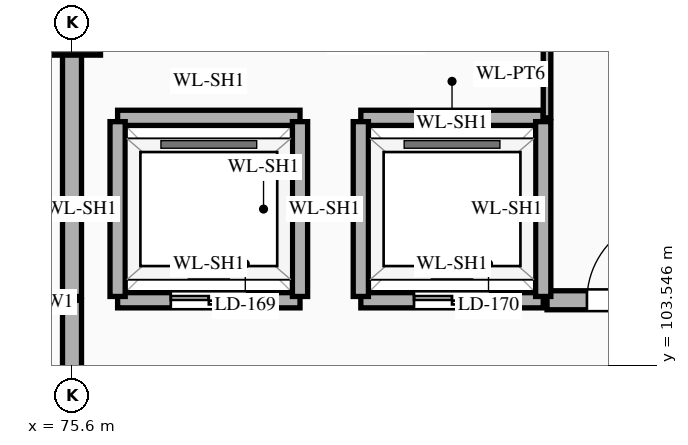
"""IFC4 building model, lengths in metres.
Left out: names, types, materials, properties, quantities, classifications, styles, units other than length and angle.
Written with IfcOpenShell. Run it as: python <this file> out.ifc"""

import sys

from ifc_helpers import new_model, si_unit, direction, frame, frame_2d, origin, origin_2d, place, context, subcontext, project, spatial, rectangle, extrude, element, fill, save


model = new_model("IFC4")
c1 = context("Model", 3, precision=1e-05, world=origin(), true_north=direction((0.0, 1.0)))
c2 = subcontext(c1, "Body", "Model", "MODEL_VIEW")
j1 = project(units=[si_unit("LENGTHUNIT", "METRE"), si_unit("PLANEANGLEUNIT", "RADIAN")], contexts=[c1])
p1 = place(None, origin())
s1 = spatial("IfcSite", under=j1, at=p1, CompositionType="ELEMENT")
p2 = place(p1, origin())
s2 = spatial("IfcBuilding", under=s1, at=p2, CompositionType="ELEMENT")
p3 = place(p2, frame((0.0, 0.0, 43.5)))
s3 = spatial("IfcBuildingStorey", under=s2, at=p3, CompositionType="ELEMENT", Elevation=43.5)
p4 = place(p3, frame((75.6, 108.0, 0.0), z_axis=(0.0, 0.0, 1.0), x_axis=(1.0, 0.0, 0.0)))
e1 = element("IfcColumn", 1, at=p4, inside=s3, PredefinedType="COLUMN", context=c2, shape_type="SweptSolid", body=[
    extrude(rectangle(XDim=0.75, YDim=0.75, at=origin_2d()), origin(), (0.0, 0.0, 1.0), 4.2),
])
p5 = place(p3, frame((76.2, 104.4, 0.0), z_axis=(0.0, 0.0, 1.0), x_axis=(1.0, 0.0, 0.0)))
e2 = element("IfcWall", 2, at=p5, inside=s3, PredefinedType="STANDARD", context=c2, shape_type="SweptSolid", body=[
    extrude(rectangle(XDim=2.4, YDim=0.2, at=frame_2d((1.2, 0.0))), origin(), (0.0, 0.0, 1.0), 3.95),
])
p6 = place(p5, frame((0.7, 0.0, 0.0)))
e3 = element("IfcOpeningElement", 3, at=p6, cuts=e2, PredefinedType="OPENING", context=c2, shape_type="SweptSolid", body=[
    extrude(rectangle(XDim=1.0, YDim=2.15, at=frame_2d((0.5, 1.075))), frame((0.0, 0.112, 0.0), z_axis=(0.0, -1.0, 0.0), x_axis=(1.0, 0.0, 0.0)), (0.0, 0.0, 1.0), 0.224),
])
p7 = place(p3, frame((79.4, 104.4, 0.0), z_axis=(0.0, 0.0, 1.0), x_axis=(1.0, 0.0, 0.0)))
e4 = element("IfcWall", 4, at=p7, inside=s3, PredefinedType="STANDARD", context=c2, shape_type="SweptSolid", body=[
    extrude(rectangle(XDim=2.4, YDim=0.2, at=frame_2d((1.2, 0.0))), origin(), (0.0, 0.0, 1.0), 3.95),
])
p8 = place(p7, frame((0.7, 0.0, 0.0)))
e5 = element("IfcOpeningElement", 5, at=p8, cuts=e4, PredefinedType="OPENING", context=c2, shape_type="SweptSolid", body=[
    extrude(rectangle(XDim=1.0, YDim=2.15, at=frame_2d((0.5, 1.075))), frame((0.0, 0.112, 0.0), z_axis=(0.0, -1.0, 0.0), x_axis=(1.0, 0.0, 0.0)), (0.0, 0.0, 1.0), 0.224),
])
p9 = place(p3, frame((81.85, 104.4, 0.0), z_axis=(0.0, 0.0, 1.0), x_axis=(1.0, 0.0, 0.0)))
e6 = element("IfcWall", 6, at=p9, inside=s3, PredefinedType="STANDARD", context=c2, shape_type="SweptSolid", body=[
    extrude(rectangle(XDim=4.3, YDim=0.25, at=frame_2d((2.15, 0.0))), origin(), (0.0, 0.0, 1.0), 3.95),
])
p10 = place(p9, frame((0.525, 0.0, 0.0)))
e7 = element("IfcOpeningElement", 7, at=p10, cuts=e6, PredefinedType="OPENING", context=c2, shape_type="SweptSolid", body=[
    extrude(rectangle(XDim=1.1, YDim=2.2, at=frame_2d((0.55, 1.1))), frame((0.0, 0.137, 0.0), z_axis=(0.0, -1.0, 0.0), x_axis=(1.0, 0.0, 0.0)), (0.0, 0.0, 1.0), 0.274),
])
p11 = place(p9, frame((2.725, 0.0, 0.0)))
e8 = element("IfcOpeningElement", 8, at=p11, cuts=e6, PredefinedType="OPENING", context=c2, shape_type="SweptSolid", body=[
    extrude(rectangle(XDim=1.0, YDim=2.2, at=frame_2d((0.5, 1.1))), frame((0.0, 0.137, 0.0), z_axis=(0.0, -1.0, 0.0), x_axis=(1.0, 0.0, 0.0)), (0.0, 0.0, 1.0), 0.274),
])
for number, where, z_axis, x_axis in (
    (9, (76.2, 106.8, 0.0), (0.0, 0.0, 1.0), (1.0, 0.0, 0.0)),
    (10, (79.4, 106.8, 0.0), (0.0, 0.0, 1.0), (1.0, 0.0, 0.0)),
):
    element("IfcWall", number, at=place(p3, frame(where, z_axis=z_axis, x_axis=x_axis)), inside=s3, PredefinedType="STANDARD", context=c2, shape_type="SweptSolid", body=[
        extrude(rectangle(XDim=2.4, YDim=0.2, at=frame_2d((1.2, 0.0))), origin(), (0.0, 0.0, 1.0), 3.95),
    ])
p12 = place(p3, frame((75.6, 100.8, 0.0), z_axis=(0.0, 0.0, 1.0), x_axis=(0.0, 1.0, 0.0)))
e11 = element("IfcWall", 11, at=p12, inside=s3, PredefinedType="STANDARD", context=c2, shape_type="SweptSolid", body=[
    extrude(rectangle(XDim=3.6, YDim=0.25, at=frame_2d((1.8, 0.0))), origin(), (0.0, 0.0, 1.0), 3.2),
])
p13 = place(p12, frame((0.798, 0.0, 0.0)))
e12 = element("IfcOpeningElement", 12, at=p13, cuts=e11, PredefinedType="OPENING", context=c2, shape_type="SweptSolid", body=[
    extrude(rectangle(XDim=1.1, YDim=2.2, at=frame_2d((0.55, 1.1))), frame((0.0, 0.137, 0.0), z_axis=(0.0, -1.0, 0.0), x_axis=(1.0, 0.0, 0.0)), (0.0, 0.0, 1.0), 0.274),
])
p14 = place(p3, frame((75.6, 104.45, 0.0), z_axis=(0.0, 0.0, 1.0), x_axis=(0.0, 1.0, 0.0)))
e13 = element("IfcWall", 13, at=p14, inside=s3, PredefinedType="STANDARD", context=c2, shape_type="SweptSolid", body=[
    extrude(rectangle(XDim=3.5, YDim=0.25, at=frame_2d((1.75, 0.0))), origin(), (0.0, 0.0, 1.0), 3.2),
])
for number, where, z_axis, x_axis in (
    (14, (76.2, 104.45, 0.0), (0.0, 0.0, 1.0), (0.0, 1.0, 0.0)),
    (15, (78.6, 104.45, 0.0), (0.0, 0.0, 1.0), (0.0, 1.0, 0.0)),
    (16, (79.4, 104.45, 0.0), (0.0, 0.0, 1.0), (0.0, 1.0, 0.0)),
    (17, (81.8, 104.45, 0.0), (0.0, 0.0, 1.0), (0.0, 1.0, 0.0)),
):
    element("IfcWall", number, at=place(p3, frame(where, z_axis=z_axis, x_axis=x_axis)), inside=s3, PredefinedType="STANDARD", context=c2, shape_type="SweptSolid", body=[
        extrude(rectangle(XDim=2.3, YDim=0.2, at=frame_2d((1.15, 0.0))), origin(), (0.0, 0.0, 1.0), 3.95),
    ])
p15 = place(p3, frame((81.85, 106.8, 0.0), z_axis=(0.0, 0.0, 1.0), x_axis=(0.0, 1.0, 0.0)))
e18 = element("IfcWall", 18, at=p15, inside=s3, PredefinedType="STANDARD", context=c2, shape_type="SweptSolid", body=[
    extrude(rectangle(XDim=1.15, YDim=0.1, at=frame_2d((0.575, 0.0))), origin(), (0.0, 0.0, 1.0), 3.95),
])
p16 = place(p6, origin())
e19 = element("IfcDoor", 19, at=p16, inside=s3, OperationType="DOUBLE_DOOR_SLIDING", PredefinedType="DOOR", context=c2, shape_type="SweptSolid", body=[
    extrude(rectangle(XDim=1.0, YDim=2.15, at=frame_2d((0.5, 1.075))), frame((0.0, 0.025, 0.0), z_axis=(0.0, -1.0, 0.0), x_axis=(1.0, 0.0, 0.0)), (0.0, 0.0, 1.0), 0.05),
])
fill(e3, e19)
p17 = place(p8, origin())
e20 = element("IfcDoor", 20, at=p17, inside=s3, OperationType="DOUBLE_DOOR_SLIDING", PredefinedType="DOOR", context=c2, shape_type="SweptSolid", body=[
    extrude(rectangle(XDim=1.0, YDim=2.15, at=frame_2d((0.5, 1.075))), frame((0.0, 0.025, 0.0), z_axis=(0.0, -1.0, 0.0), x_axis=(1.0, 0.0, 0.0)), (0.0, 0.0, 1.0), 0.05),
])
fill(e5, e20)
p18 = place(p10, origin())
e21 = element("IfcDoor", 21, at=p18, inside=s3, OperationType="SINGLE_SWING_RIGHT", PredefinedType="DOOR", context=c2, shape_type="SweptSolid", body=[
    extrude(rectangle(XDim=1.1, YDim=2.2, at=frame_2d((0.55, 1.1))), frame((0.0, 0.025, 0.0), z_axis=(0.0, -1.0, 0.0), x_axis=(1.0, 0.0, 0.0)), (0.0, 0.0, 1.0), 0.05),
])
fill(e7, e21)
save(model, sys.argv[1])
